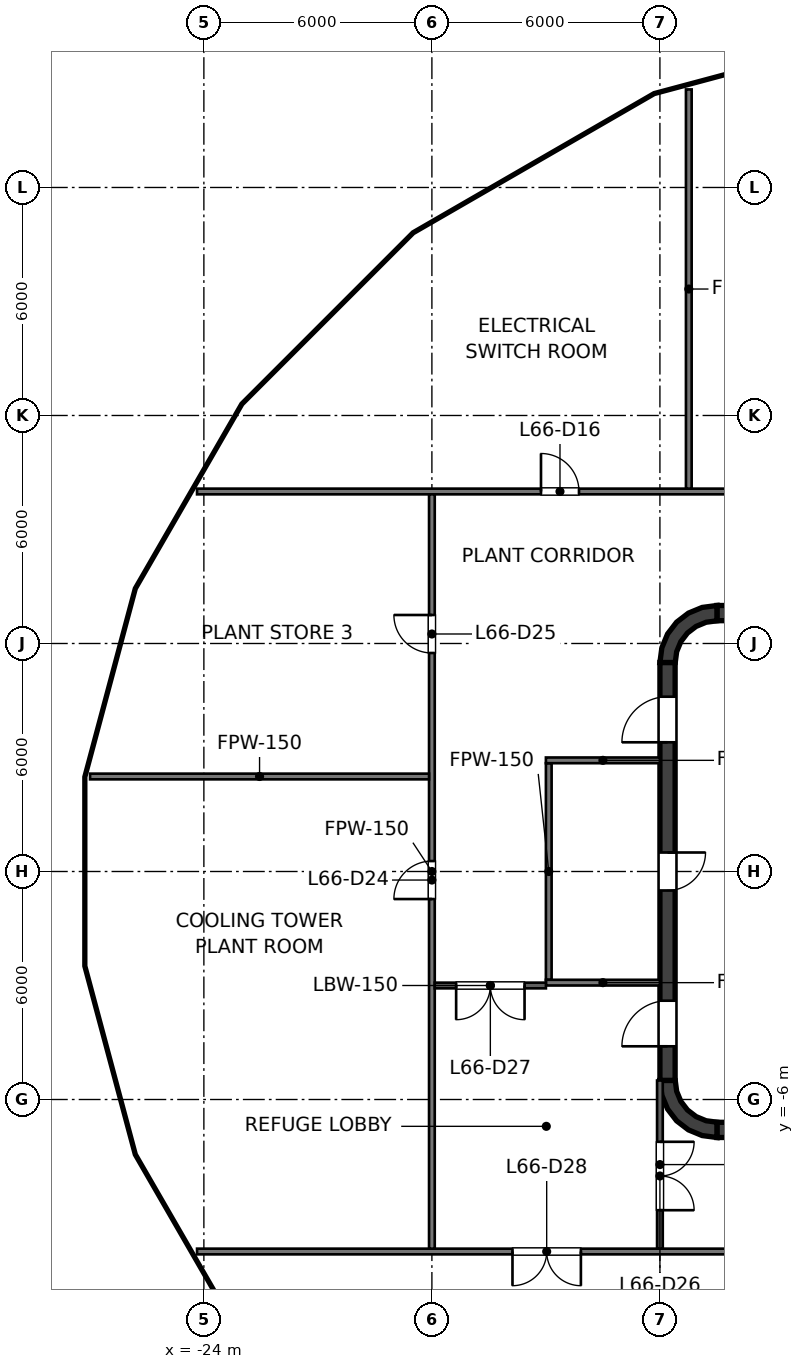
"""IFC4 building model, lengths in metres.
Left out: names, types, materials, properties, quantities, classifications, styles, units other than length and angle.
Written with IfcOpenShell. Run it as: python <this file> out.ifc"""

import sys

from ifc_helpers import new_model, si_unit, direction, frame, frame_2d, origin, place, context, subcontext, project, spatial, polyline, rectangle, outline, extrude, element, fill, save


model = new_model("IFC4")
c1 = context("Model", 3, precision=1e-05, world=origin(), true_north=direction((0.0, 1.0)))
c2 = subcontext(c1, "Body", "Model", "MODEL_VIEW")
j1 = project(units=[si_unit("LENGTHUNIT", "METRE"), si_unit("PLANEANGLEUNIT", "RADIAN")], contexts=[c1])
p1 = place(None, origin())
s1 = spatial("IfcSite", under=j1, at=p1, CompositionType="ELEMENT")
p2 = place(p1, origin())
s2 = spatial("IfcBuilding", under=s1, at=p2, CompositionType="ELEMENT")
p3 = place(p2, frame((0.0, 0.0, 299.0)))
s3 = spatial("IfcBuildingStorey", under=s2, at=p3, CompositionType="ELEMENT", Elevation=299.0)
for number, where, z_axis, x_axis in (
    (1, (-10.5, 6.8, 0.0), (0.0, 0.0, 1.0), (1.0, 0.0, 0.0)),
    (2, (-10.5, -6.8, 0.0), (0.0, 0.0, 1.0), (1.0, 0.0, 0.0)),
):
    element("IfcWall", number, at=place(p3, frame(where, z_axis=z_axis, x_axis=x_axis)), inside=s3, PredefinedType="SHEAR", context=c2, shape_type="SweptSolid", body=[
        extrude(rectangle(XDim=21.0, YDim=0.4, at=frame_2d((10.5, 0.0))), origin(), (0.0, 0.0, 1.0), 5.4),
    ])
p4 = place(p3, frame((-11.8, -5.5, 0.0), z_axis=(0.0, 0.0, 1.0), x_axis=(0.0, 1.0, 0.0)))
e3 = element("IfcWall", 3, at=p4, inside=s3, PredefinedType="SHEAR", context=c2, shape_type="SweptSolid", body=[
    extrude(rectangle(XDim=11.0, YDim=0.4, at=frame_2d((5.5, 0.0))), origin(), (0.0, 0.0, 1.0), 5.4),
])
p5 = place(p4, frame((5.0, 0.0, 0.0)))
e4 = element("IfcOpeningElement", 4, at=p5, cuts=e3, PredefinedType="OPENING", context=c2, shape_type="SweptSolid", body=[
    extrude(rectangle(XDim=1.0, YDim=2.1, at=frame_2d((0.5, 1.05))), frame((0.0, 0.2, 0.0), z_axis=(0.0, -1.0, 0.0), x_axis=(1.0, 0.0, 0.0)), (0.0, 0.0, 1.0), 0.4),
])
p6 = place(p4, frame((0.9, 0.0, 0.0)))
e5 = element("IfcOpeningElement", 5, at=p6, cuts=e3, PredefinedType="OPENING", context=c2, shape_type="SweptSolid", body=[
    extrude(rectangle(XDim=1.2, YDim=2.1, at=frame_2d((0.6, 1.05))), frame((0.0, 0.2, 0.0), z_axis=(0.0, -1.0, 0.0), x_axis=(1.0, 0.0, 0.0)), (0.0, 0.0, 1.0), 0.4),
])
p7 = place(p4, frame((8.9, 0.0, 0.0)))
e6 = element("IfcOpeningElement", 6, at=p7, cuts=e3, PredefinedType="OPENING", context=c2, shape_type="SweptSolid", body=[
    extrude(rectangle(XDim=1.2, YDim=2.1, at=frame_2d((0.6, 1.05))), frame((0.0, 0.2, 0.0), z_axis=(0.0, -1.0, 0.0), x_axis=(1.0, 0.0, 0.0)), (0.0, 0.0, 1.0), 0.4),
])
p8 = place(p3, origin())
e7 = element("IfcWall", 7, at=p8, inside=s3, PredefinedType="SHEAR", context=c2, shape_type="SweptSolid", body=[
    extrude(outline(polyline([(-12.0, 5.5), (-11.596, 5.5), (-11.559, 5.784), (-11.45, 6.048), (-11.275, 6.275), (-11.048, 6.45), (-10.784, 6.559), (-10.5, 6.596), (-10.5, 7.0), (-10.888, 6.949), (-11.25, 6.799), (-11.561, 6.561), (-11.799, 6.25), (-11.949, 5.888), (-12.0, 5.5)])), origin(), (0.0, 0.0, 1.0), 5.4),
])
e8 = element("IfcWall", 8, at=p8, inside=s3, PredefinedType="SHEAR", context=c2, shape_type="SweptSolid", body=[
    extrude(outline(polyline([(-10.5, -7.0), (-10.5, -6.596), (-10.784, -6.559), (-11.048, -6.45), (-11.275, -6.275), (-11.45, -6.048), (-11.559, -5.784), (-11.596, -5.5), (-12.0, -5.5), (-11.949, -5.888), (-11.799, -6.25), (-11.561, -6.561), (-11.25, -6.799), (-10.888, -6.949), (-10.5, -7.0)])), origin(), (0.0, 0.0, 1.0), 5.4),
])
p9 = place(p3, frame((-14.925, -2.85, 0.0), z_axis=(0.0, 0.0, 1.0), x_axis=(0.0, 1.0, 0.0)))
e9 = element("IfcWall", 9, at=p9, inside=s3, PredefinedType="PARTITIONING", context=c2, shape_type="SweptSolid", body=[
    extrude(rectangle(XDim=5.7, YDim=0.15, at=frame_2d((2.85, 0.0))), origin(), (0.0, 0.0, 1.0), 4.327),
])
for number, where, z_axis, x_axis in (
    (10, (-15.0, 2.925, 0.0), (0.0, 0.0, 1.0), (1.0, 0.0, 0.0)),
    (11, (-15.0, -2.925, 0.0), (0.0, 0.0, 1.0), (1.0, 0.0, 0.0)),
):
    element("IfcWall", number, at=place(p3, frame(where, z_axis=z_axis, x_axis=x_axis)), inside=s3, PredefinedType="PARTITIONING", context=c2, shape_type="SweptSolid", body=[
        extrude(rectangle(XDim=3.0, YDim=0.15, at=frame_2d((1.5, 0.0))), origin(), (0.0, 0.0, 1.0), 4.476),
    ])
p10 = place(p3, frame((-24.179, 10.0, 0.0), z_axis=(0.0, 0.0, 1.0), x_axis=(1.0, 0.0, 0.0)))
e12 = element("IfcWall", 12, at=p10, inside=s3, PredefinedType="PARTITIONING", context=c2, shape_type="SweptSolid", body=[
    extrude(rectangle(XDim=48.359, YDim=0.15, at=frame_2d((24.179, 0.0))), origin(), (0.0, 0.0, 1.0), 4.327),
])
p11 = place(p10, frame((9.05, 0.0, 0.0)))
e13 = element("IfcOpeningElement", 13, at=p11, cuts=e12, PredefinedType="OPENING", context=c2, shape_type="SweptSolid", body=[
    extrude(rectangle(XDim=1.0, YDim=2.1, at=frame_2d((0.5, 1.05))), frame((0.0, 0.075, 0.0), z_axis=(0.0, -1.0, 0.0), x_axis=(1.0, 0.0, 0.0)), (0.0, 0.0, 1.0), 0.15),
])
p12 = place(p10, frame((17.1, 0.0, 0.0)))
e14 = element("IfcOpeningElement", 14, at=p12, cuts=e12, PredefinedType="OPENING", context=c2, shape_type="SweptSolid", body=[
    extrude(rectangle(XDim=1.0, YDim=2.1, at=frame_2d((0.5, 1.05))), frame((0.0, 0.075, 0.0), z_axis=(0.0, -1.0, 0.0), x_axis=(1.0, 0.0, 0.0)), (0.0, 0.0, 1.0), 0.15),
])
p13 = place(p10, frame((33.3, 0.0, 0.0)))
e15 = element("IfcOpeningElement", 15, at=p13, cuts=e12, PredefinedType="OPENING", context=c2, shape_type="SweptSolid", body=[
    extrude(rectangle(XDim=1.0, YDim=2.1, at=frame_2d((0.5, 1.05))), frame((0.0, 0.075, 0.0), z_axis=(0.0, -1.0, 0.0), x_axis=(1.0, 0.0, 0.0)), (0.0, 0.0, 1.0), 0.15),
])
p14 = place(p10, frame((40.3, 0.0, 0.0)))
e16 = element("IfcOpeningElement", 16, at=p14, cuts=e12, PredefinedType="OPENING", context=c2, shape_type="SweptSolid", body=[
    extrude(rectangle(XDim=1.0, YDim=2.1, at=frame_2d((0.5, 1.05))), frame((0.0, 0.075, 0.0), z_axis=(0.0, -1.0, 0.0), x_axis=(1.0, 0.0, 0.0)), (0.0, 0.0, 1.0), 0.15),
])
p15 = place(p10, frame((24.25, 0.0, 0.0)))
e17 = element("IfcOpeningElement", 17, at=p15, cuts=e12, PredefinedType="OPENING", context=c2, shape_type="SweptSolid", body=[
    extrude(rectangle(XDim=1.8, YDim=2.1, at=frame_2d((0.9, 1.05))), frame((0.0, 0.075, 0.0), z_axis=(0.0, -1.0, 0.0), x_axis=(1.0, 0.0, 0.0)), (0.0, 0.0, 1.0), 0.15),
])
p16 = place(p3, frame((-24.179, -10.0, 0.0), z_axis=(0.0, 0.0, 1.0), x_axis=(1.0, 0.0, 0.0)))
e18 = element("IfcWall", 18, at=p16, inside=s3, PredefinedType="PARTITIONING", context=c2, shape_type="SweptSolid", body=[
    extrude(rectangle(XDim=48.359, YDim=0.15, at=frame_2d((24.179, 0.0))), origin(), (0.0, 0.0, 1.0), 4.327),
])
p17 = place(p16, frame((31.05, 0.0, 0.0)))
e19 = element("IfcOpeningElement", 19, at=p17, cuts=e18, PredefinedType="OPENING", context=c2, shape_type="SweptSolid", body=[
    extrude(rectangle(XDim=1.0, YDim=2.1, at=frame_2d((0.5, 1.05))), frame((0.0, 0.075, 0.0), z_axis=(0.0, -1.0, 0.0), x_axis=(1.0, 0.0, 0.0)), (0.0, 0.0, 1.0), 0.15),
])
p18 = place(p16, frame((39.05, 0.0, 0.0)))
e20 = element("IfcOpeningElement", 20, at=p18, cuts=e18, PredefinedType="OPENING", context=c2, shape_type="SweptSolid", body=[
    extrude(rectangle(XDim=1.0, YDim=2.1, at=frame_2d((0.5, 1.05))), frame((0.0, 0.075, 0.0), z_axis=(0.0, -1.0, 0.0), x_axis=(1.0, 0.0, 0.0)), (0.0, 0.0, 1.0), 0.15),
])
p19 = place(p16, frame((8.3, 0.0, 0.0)))
e21 = element("IfcOpeningElement", 21, at=p19, cuts=e18, PredefinedType="OPENING", context=c2, shape_type="SweptSolid", body=[
    extrude(rectangle(XDim=1.8, YDim=2.1, at=frame_2d((0.9, 1.05))), frame((0.0, 0.075, 0.0), z_axis=(0.0, -1.0, 0.0), x_axis=(1.0, 0.0, 0.0)), (0.0, 0.0, 1.0), 0.15),
])
p20 = place(p16, frame((22.35, 0.0, 0.0)))
e22 = element("IfcOpeningElement", 22, at=p20, cuts=e18, PredefinedType="OPENING", context=c2, shape_type="SweptSolid", body=[
    extrude(rectangle(XDim=1.8, YDim=2.1, at=frame_2d((0.9, 1.05))), frame((0.0, 0.075, 0.0), z_axis=(0.0, -1.0, 0.0), x_axis=(1.0, 0.0, 0.0)), (0.0, 0.0, 1.0), 0.15),
])
p21 = place(p3, frame((-18.0, -9.925, 0.0), z_axis=(0.0, 0.0, 1.0), x_axis=(0.0, 1.0, 0.0)))
e23 = element("IfcWall", 23, at=p21, inside=s3, PredefinedType="PARTITIONING", context=c2, shape_type="SweptSolid", body=[
    extrude(rectangle(XDim=19.85, YDim=0.15, at=frame_2d((9.925, 0.0))), origin(), (0.0, 0.0, 1.0), 4.327),
])
p22 = place(p21, frame((9.2, 0.0, 0.0)))
e24 = element("IfcOpeningElement", 24, at=p22, cuts=e23, PredefinedType="OPENING", context=c2, shape_type="SweptSolid", body=[
    extrude(rectangle(XDim=1.0, YDim=2.1, at=frame_2d((0.5, 1.05))), frame((0.0, 0.075, 0.0), z_axis=(0.0, -1.0, 0.0), x_axis=(1.0, 0.0, 0.0)), (0.0, 0.0, 1.0), 0.15),
])
p23 = place(p21, frame((15.675, 0.0, 0.0)))
e25 = element("IfcOpeningElement", 25, at=p23, cuts=e23, PredefinedType="OPENING", context=c2, shape_type="SweptSolid", body=[
    extrude(rectangle(XDim=1.0, YDim=2.1, at=frame_2d((0.5, 1.05))), frame((0.0, 0.075, 0.0), z_axis=(0.0, -1.0, 0.0), x_axis=(1.0, 0.0, 0.0)), (0.0, 0.0, 1.0), 0.15),
])
p24 = place(p3, frame((-12.0, -5.5, 0.0), z_axis=(0.0, 0.0, 1.0), x_axis=(0.0, -1.0, 0.0)))
e26 = element("IfcWall", 26, at=p24, inside=s3, PredefinedType="PARTITIONING", context=c2, shape_type="SweptSolid", body=[
    extrude(rectangle(XDim=4.425, YDim=0.15, at=frame_2d((2.212, 0.0))), origin(), (0.0, 0.0, 1.0), 4.476),
])
p25 = place(p24, frame((1.613, 0.0, 0.0)))
e27 = element("IfcOpeningElement", 27, at=p25, cuts=e26, PredefinedType="OPENING", context=c2, shape_type="SweptSolid", body=[
    extrude(rectangle(XDim=1.8, YDim=2.1, at=frame_2d((0.9, 1.05))), frame((0.0, 0.075, 0.0), z_axis=(0.0, -1.0, 0.0), x_axis=(1.0, 0.0, 0.0)), (0.0, 0.0, 1.0), 0.15),
])
p26 = place(p3, frame((-15.0, -3.0, 0.0), z_axis=(0.0, 0.0, 1.0), x_axis=(-1.0, 0.0, 0.0)))
e28 = element("IfcWall", 28, at=p26, inside=s3, PredefinedType="PARTITIONING", context=c2, shape_type="SweptSolid", body=[
    extrude(rectangle(XDim=2.925, YDim=0.15, at=frame_2d((1.462, 0.0))), origin(), (0.0, 0.0, 1.0), 4.476),
])
p27 = place(p26, frame((0.562, 0.0, 0.0)))
e29 = element("IfcOpeningElement", 29, at=p27, cuts=e28, PredefinedType="OPENING", context=c2, shape_type="SweptSolid", body=[
    extrude(rectangle(XDim=1.8, YDim=2.1, at=frame_2d((0.9, 1.05))), frame((0.0, 0.075, 0.0), z_axis=(0.0, -1.0, 0.0), x_axis=(1.0, 0.0, 0.0)), (0.0, 0.0, 1.0), 0.15),
])
p28 = place(p3, frame((-11.24, 10.075, 0.0), z_axis=(0.0, 0.0, 1.0), x_axis=(0.0, 1.0, 0.0)))
e30 = element("IfcWall", 30, at=p28, inside=s3, PredefinedType="PARTITIONING", context=c2, shape_type="SweptSolid", body=[
    extrude(rectangle(XDim=10.505, YDim=0.15, at=frame_2d((5.252, 0.0))), origin(), (0.0, 0.0, 1.0), 4.327),
])
p29 = place(p3, frame((-18.075, 2.5, 0.0), z_axis=(0.0, 0.0, 1.0), x_axis=(-1.0, 0.0, 0.0)))
e31 = element("IfcWall", 31, at=p29, inside=s3, PredefinedType="PARTITIONING", context=c2, shape_type="SweptSolid", body=[
    extrude(rectangle(XDim=8.92, YDim=0.15, at=frame_2d((4.46, 0.0))), origin(), (0.0, 0.0, 1.0), 4.327),
])
p30 = place(p5, origin())
e32 = element("IfcDoor", 32, at=p30, inside=s3, OperationType="SINGLE_SWING_RIGHT", PredefinedType="DOOR", context=c2, shape_type="SweptSolid", body=[
    extrude(rectangle(XDim=1.0, YDim=2.1, at=frame_2d((0.5, 1.05))), frame((0.0, 0.025, 0.0), z_axis=(0.0, -1.0, 0.0), x_axis=(1.0, 0.0, 0.0)), (0.0, 0.0, 1.0), 0.05),
])
fill(e4, e32)
p31 = place(p6, origin())
e33 = element("IfcDoor", 33, at=p31, inside=s3, OperationType="SINGLE_SWING_LEFT", PredefinedType="DOOR", context=c2, shape_type="SweptSolid", body=[
    extrude(rectangle(XDim=1.2, YDim=2.1, at=frame_2d((0.6, 1.05))), frame((0.0, 0.025, 0.0), z_axis=(0.0, -1.0, 0.0), x_axis=(1.0, 0.0, 0.0)), (0.0, 0.0, 1.0), 0.05),
])
fill(e5, e33)
p32 = place(p7, origin())
e34 = element("IfcDoor", 34, at=p32, inside=s3, OperationType="SINGLE_SWING_LEFT", PredefinedType="DOOR", context=c2, shape_type="SweptSolid", body=[
    extrude(rectangle(XDim=1.2, YDim=2.1, at=frame_2d((0.6, 1.05))), frame((0.0, 0.025, 0.0), z_axis=(0.0, -1.0, 0.0), x_axis=(1.0, 0.0, 0.0)), (0.0, 0.0, 1.0), 0.05),
])
fill(e6, e34)
p33 = place(p11, origin())
e35 = element("IfcDoor", 35, at=p33, inside=s3, OperationType="SINGLE_SWING_LEFT", PredefinedType="DOOR", context=c2, shape_type="SweptSolid", body=[
    extrude(rectangle(XDim=1.0, YDim=2.1, at=frame_2d((0.5, 1.05))), frame((0.0, 0.025, 0.0), z_axis=(0.0, -1.0, 0.0), x_axis=(1.0, 0.0, 0.0)), (0.0, 0.0, 1.0), 0.05),
])
fill(e13, e35)
p34 = place(p22, origin())
e36 = element("IfcDoor", 36, at=p34, inside=s3, OperationType="SINGLE_SWING_LEFT", PredefinedType="DOOR", context=c2, shape_type="SweptSolid", body=[
    extrude(rectangle(XDim=1.0, YDim=2.1, at=frame_2d((0.5, 1.05))), frame((0.0, 0.025, 0.0), z_axis=(0.0, -1.0, 0.0), x_axis=(1.0, 0.0, 0.0)), (0.0, 0.0, 1.0), 0.05),
])
fill(e24, e36)
p35 = place(p23, origin())
e37 = element("IfcDoor", 37, at=p35, inside=s3, OperationType="SINGLE_SWING_RIGHT", PredefinedType="DOOR", context=c2, shape_type="SweptSolid", body=[
    extrude(rectangle(XDim=1.0, YDim=2.1, at=frame_2d((0.5, 1.05))), frame((0.0, 0.025, 0.0), z_axis=(0.0, -1.0, 0.0), x_axis=(1.0, 0.0, 0.0)), (0.0, 0.0, 1.0), 0.05),
])
fill(e25, e37)
p36 = place(p25, origin())
e38 = element("IfcDoor", 38, at=p36, inside=s3, OperationType="DOUBLE_DOOR_SINGLE_SWING", PredefinedType="DOOR", context=c2, shape_type="SweptSolid", body=[
    extrude(rectangle(XDim=1.8, YDim=2.1, at=frame_2d((0.9, 1.05))), frame((0.0, 0.025, 0.0), z_axis=(0.0, -1.0, 0.0), x_axis=(1.0, 0.0, 0.0)), (0.0, 0.0, 1.0), 0.05),
])
fill(e27, e38)
p37 = place(p27, origin())
e39 = element("IfcDoor", 39, at=p37, inside=s3, OperationType="DOUBLE_DOOR_SINGLE_SWING", PredefinedType="DOOR", context=c2, shape_type="SweptSolid", body=[
    extrude(rectangle(XDim=1.8, YDim=2.1, at=frame_2d((0.9, 1.05))), frame((0.0, 0.025, 0.0), z_axis=(0.0, -1.0, 0.0), x_axis=(1.0, 0.0, 0.0)), (0.0, 0.0, 1.0), 0.05),
])
fill(e29, e39)
p38 = place(p19, origin())
e40 = element("IfcDoor", 40, at=p38, inside=s3, OperationType="DOUBLE_DOOR_SINGLE_SWING", PredefinedType="DOOR", context=c2, shape_type="SweptSolid", body=[
    extrude(rectangle(XDim=1.8, YDim=2.1, at=frame_2d((0.9, 1.05))), frame((0.0, 0.025, 0.0), z_axis=(0.0, -1.0, 0.0), x_axis=(1.0, 0.0, 0.0)), (0.0, 0.0, 1.0), 0.05),
])
fill(e21, e40)
save(model, sys.argv[1])
